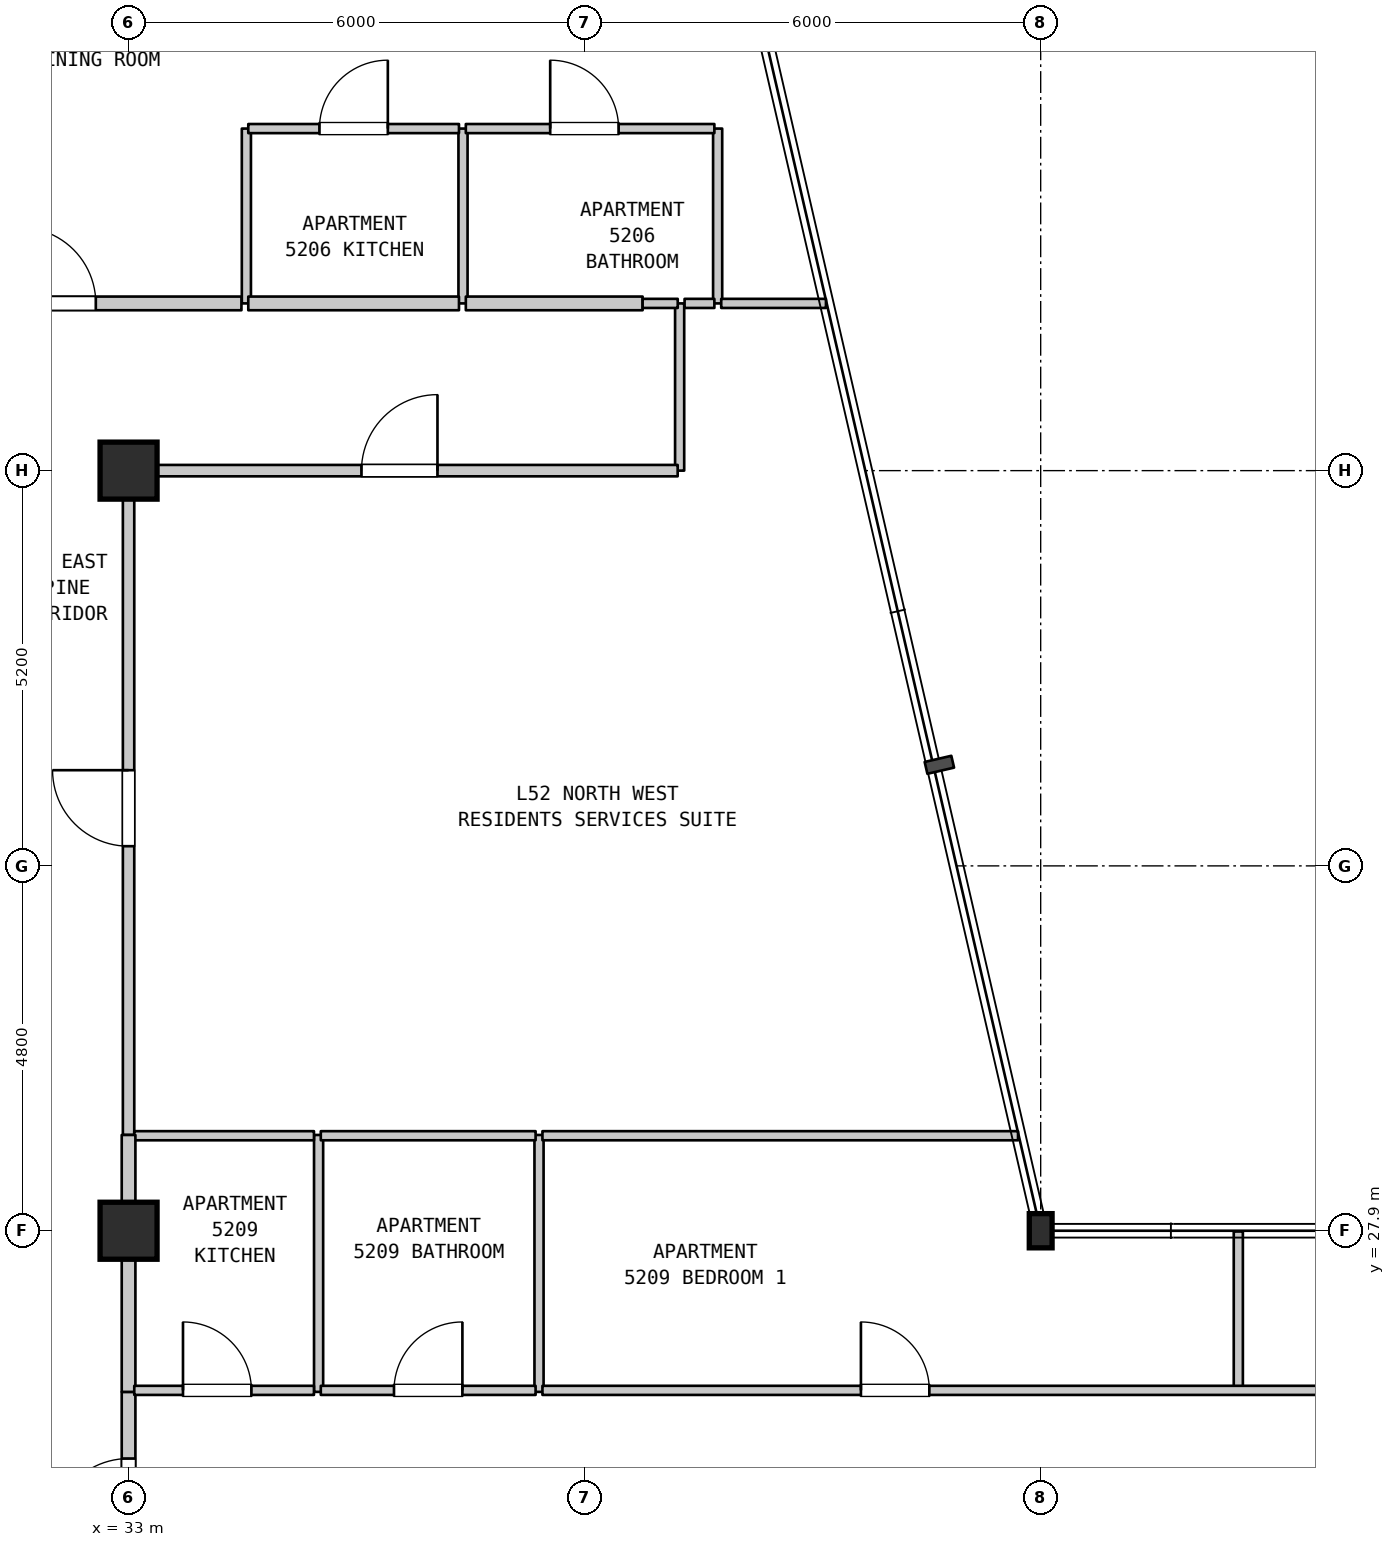
"""IFC4 building model, lengths in metres.
Left out: names, types, materials, properties, quantities, classifications, styles, units other than length and angle.
Written with IfcOpenShell. Run it as: python <this file> out.ifc"""

import sys

from ifc_helpers import new_model, si_unit, direction, frame, frame_2d, origin, origin_2d, place, context, subcontext, project, spatial, rectangle, i_section, extrude, element, fill, save


model = new_model("IFC4")
c1 = context("Model", 3, precision=1e-05, world=origin(), true_north=direction((0.0, 1.0)))
c2 = subcontext(c1, "Body", "Model", "MODEL_VIEW")
j1 = project(units=[si_unit("LENGTHUNIT", "METRE"), si_unit("PLANEANGLEUNIT", "RADIAN")], contexts=[c1])
p1 = place(None, origin())
s1 = spatial("IfcSite", under=j1, at=p1, CompositionType="ELEMENT")
p2 = place(p1, origin())
s2 = spatial("IfcBuilding", under=s1, at=p2, CompositionType="ELEMENT")
p3 = place(p2, frame((0.0, 0.0, 210.6)))
s3 = spatial("IfcBuildingStorey", under=s2, at=p3, CompositionType="ELEMENT", Elevation=210.6)
for number, where, z_axis, x_axis in (
    (1, (33.0, 27.9, 0.0), (0.0, 0.0, 1.0), (1.0, 0.0, 0.0)),
    (2, (33.0, 37.9, 0.0), (0.0, 0.0, 1.0), (1.0, 0.0, 0.0)),
):
    element("IfcColumn", number, at=place(p3, frame(where, z_axis=z_axis, x_axis=x_axis)), inside=s3, PredefinedType="COLUMN", context=c2, shape_type="SweptSolid", body=[
        extrude(rectangle(XDim=0.75, YDim=0.75, at=origin_2d()), origin(), (0.0, 0.0, 1.0), 3.7),
    ])
p4 = place(p3, frame((45.0, 27.9, 0.0), z_axis=(0.0, 0.0, 1.0), x_axis=(1.0, 0.0, 0.0)))
e3 = element("IfcColumn", 3, at=p4, inside=s3, PredefinedType="COLUMN", context=c2, shape_type="SweptSolid", body=[
    extrude(i_section(OverallWidth=0.3, OverallDepth=0.45, WebThickness=0.014, FlangeThickness=0.026, FilletRadius=0.027, at=origin_2d()), origin(), (0.0, 0.0, 1.0), 3.7),
])
p5 = place(p3, frame((33.0, 23.18, 0.0), z_axis=(0.0, 0.0, 1.0), x_axis=(0.0, 1.0, 0.0)))
e4 = element("IfcWall", 4, at=p5, inside=s3, PredefinedType="STANDARD", context=c2, shape_type="SweptSolid", body=[
    extrude(rectangle(XDim=2.6, YDim=0.18, at=frame_2d((1.3, 0.0))), origin(), (0.0, 0.0, 1.0), 2.99),
])
p6 = place(p5, frame((0.723, 0.0, 0.0)))
e5 = element("IfcOpeningElement", 5, at=p6, cuts=e4, PredefinedType="OPENING", context=c2, shape_type="SweptSolid", body=[
    extrude(rectangle(XDim=1.0, YDim=2.15, at=frame_2d((0.5, 1.075))), frame((0.0, 0.1, 0.0), z_axis=(0.0, -1.0, 0.0), x_axis=(1.0, 0.0, 0.0)), (0.0, 0.0, 1.0), 0.2),
])
p7 = place(p3, frame((33.0, 25.78, 0.0), z_axis=(0.0, 0.0, 1.0), x_axis=(0.0, 1.0, 0.0)))
e6 = element("IfcWall", 6, at=p7, inside=s3, PredefinedType="STANDARD", context=c2, shape_type="SweptSolid", body=[
    extrude(rectangle(XDim=2.12, YDim=0.18, at=frame_2d((1.06, 0.0))), origin(), (0.0, 0.0, 1.0), 2.99),
])
p8 = place(p3, frame((33.0, 29.16, 0.0), z_axis=(0.0, 0.0, 1.0), x_axis=(0.0, 1.0, 0.0)))
e7 = element("IfcWall", 7, at=p8, inside=s3, PredefinedType="STANDARD", context=c2, shape_type="SweptSolid", body=[
    extrude(rectangle(XDim=8.74, YDim=0.15, at=frame_2d((4.37, 0.0))), origin(), (0.0, 0.0, 1.0), 2.89),
])
p9 = place(p8, frame((3.799, 0.0, 0.0)))
e8 = element("IfcOpeningElement", 8, at=p9, cuts=e7, PredefinedType="OPENING", context=c2, shape_type="SweptSolid", body=[
    extrude(rectangle(XDim=1.0, YDim=2.15, at=frame_2d((0.5, 1.075))), frame((0.0, 0.085, 0.0), z_axis=(0.0, -1.0, 0.0), x_axis=(1.0, 0.0, 0.0)), (0.0, 0.0, 1.0), 0.17),
])
p10 = place(p3, frame((34.55, 40.1, 0.0), z_axis=(0.0, 0.0, 1.0), x_axis=(0.0, 1.0, 0.0)))
e9 = element("IfcWall", 9, at=p10, inside=s3, PredefinedType="PARTITIONING", context=c2, shape_type="SweptSolid", body=[
    extrude(rectangle(XDim=2.3, YDim=0.12, at=frame_2d((1.15, 0.0))), origin(), (0.0, 0.0, 1.0), 3.39),
])
p11 = place(p3, frame((35.5, 25.78, 0.0), z_axis=(0.0, 0.0, 1.0), x_axis=(0.0, 1.0, 0.0)))
e10 = element("IfcWall", 10, at=p11, inside=s3, PredefinedType="PARTITIONING", context=c2, shape_type="SweptSolid", body=[
    extrude(rectangle(XDim=3.38, YDim=0.12, at=frame_2d((1.69, 0.0))), origin(), (0.0, 0.0, 1.0), 3.39),
])
p12 = place(p3, frame((37.4, 40.1, 0.0), z_axis=(0.0, 0.0, 1.0), x_axis=(0.0, 1.0, 0.0)))
e11 = element("IfcWall", 11, at=p12, inside=s3, PredefinedType="PARTITIONING", context=c2, shape_type="SweptSolid", body=[
    extrude(rectangle(XDim=2.3, YDim=0.12, at=frame_2d((1.15, 0.0))), origin(), (0.0, 0.0, 1.0), 3.39),
])
p13 = place(p3, frame((38.4, 25.78, 0.0), z_axis=(0.0, 0.0, 1.0), x_axis=(0.0, 1.0, 0.0)))
e12 = element("IfcWall", 12, at=p13, inside=s3, PredefinedType="PARTITIONING", context=c2, shape_type="SweptSolid", body=[
    extrude(rectangle(XDim=3.38, YDim=0.12, at=frame_2d((1.69, 0.0))), origin(), (0.0, 0.0, 1.0), 3.39),
])
p14 = place(p3, frame((40.25, 37.9, 0.0), z_axis=(0.0, 0.0, 1.0), x_axis=(0.0, 1.0, 0.0)))
e13 = element("IfcWall", 13, at=p14, inside=s3, PredefinedType="PARTITIONING", context=c2, shape_type="SweptSolid", body=[
    extrude(rectangle(XDim=2.2, YDim=0.12, at=frame_2d((1.1, 0.0))), origin(), (0.0, 0.0, 1.0), 3.39),
])
p15 = place(p3, frame((40.75, 40.1, 0.0), z_axis=(0.0, 0.0, 1.0), x_axis=(0.0, 1.0, 0.0)))
e14 = element("IfcWall", 14, at=p15, inside=s3, PredefinedType="PARTITIONING", context=c2, shape_type="SweptSolid", body=[
    extrude(rectangle(XDim=2.3, YDim=0.12, at=frame_2d((1.15, 0.0))), origin(), (0.0, 0.0, 1.0), 3.39),
])
p16 = place(p3, frame((47.6, 25.78, 0.0), z_axis=(0.0, 0.0, 1.0), x_axis=(0.0, 1.0, 0.0)))
e15 = element("IfcWall", 15, at=p16, inside=s3, PredefinedType="PARTITIONING", context=c2, shape_type="SweptSolid", body=[
    extrude(rectangle(XDim=2.11, YDim=0.12, at=frame_2d((1.055, 0.0))), origin(), (0.0, 0.0, 1.0), 3.39),
])
p17 = place(p3, frame((33.075, 25.8, 0.0), z_axis=(0.0, 0.0, 1.0), x_axis=(1.0, 0.0, 0.0)))
e16 = element("IfcWall", 16, at=p17, inside=s3, PredefinedType="PARTITIONING", context=c2, shape_type="SweptSolid", body=[
    extrude(rectangle(XDim=2.364, YDim=0.12, at=frame_2d((1.182, 0.0))), origin(), (0.0, 0.0, 1.0), 3.39),
])
p18 = place(p17, frame((0.641, 0.0, 0.0)))
e17 = element("IfcOpeningElement", 17, at=p18, cuts=e16, PredefinedType="OPENING", context=c2, shape_type="SweptSolid", body=[
    extrude(rectangle(XDim=0.9, YDim=2.15, at=frame_2d((0.45, 1.075))), frame((0.0, 0.07, 0.0), z_axis=(0.0, -1.0, 0.0), x_axis=(1.0, 0.0, 0.0)), (0.0, 0.0, 1.0), 0.14),
])
p19 = place(p3, frame((35.529, 25.8, 0.0), z_axis=(0.0, 0.0, 1.0), x_axis=(1.0, 0.0, 0.0)))
e18 = element("IfcWall", 18, at=p19, inside=s3, PredefinedType="PARTITIONING", context=c2, shape_type="SweptSolid", body=[
    extrude(rectangle(XDim=2.826, YDim=0.12, at=frame_2d((1.413, 0.0))), origin(), (0.0, 0.0, 1.0), 3.39),
])
p20 = place(p19, frame((0.963, 0.0, 0.0)))
e19 = element("IfcOpeningElement", 19, at=p20, cuts=e18, PredefinedType="OPENING", context=c2, shape_type="SweptSolid", body=[
    extrude(rectangle(XDim=0.9, YDim=2.1, at=frame_2d((0.45, 1.05))), frame((0.0, 0.07, 0.0), z_axis=(0.0, -1.0, 0.0), x_axis=(1.0, 0.0, 0.0)), (0.0, 0.0, 1.0), 0.14),
])
p21 = place(p3, frame((38.445, 25.8, 0.0), z_axis=(0.0, 0.0, 1.0), x_axis=(1.0, 0.0, 0.0)))
e20 = element("IfcWall", 20, at=p21, inside=s3, PredefinedType="PARTITIONING", context=c2, shape_type="SweptSolid", body=[
    extrude(rectangle(XDim=18.545, YDim=0.12, at=frame_2d((9.272, 0.0))), origin(), (0.0, 0.0, 1.0), 3.39),
])
p22 = place(p21, frame((4.19, 0.0, 0.0)))
e21 = element("IfcOpeningElement", 21, at=p22, cuts=e20, PredefinedType="OPENING", context=c2, shape_type="SweptSolid", body=[
    extrude(rectangle(XDim=0.9, YDim=2.15, at=frame_2d((0.45, 1.075))), frame((0.0, 0.07, 0.0), z_axis=(0.0, -1.0, 0.0), x_axis=(1.0, 0.0, 0.0)), (0.0, 0.0, 1.0), 0.14),
])
p23 = place(p21, frame((13.335, 0.0, 0.0)))
e22 = element("IfcOpeningElement", 22, at=p23, cuts=e20, PredefinedType="OPENING", context=c2, shape_type="SweptSolid", body=[
    extrude(rectangle(XDim=0.9, YDim=2.15, at=frame_2d((0.45, 1.075))), frame((0.0, 0.07, 0.0), z_axis=(0.0, -1.0, 0.0), x_axis=(1.0, 0.0, 0.0)), (0.0, 0.0, 1.0), 0.14),
])
p24 = place(p3, frame((33.075, 29.15, 0.0), z_axis=(0.0, 0.0, 1.0), x_axis=(1.0, 0.0, 0.0)))
e23 = element("IfcWall", 23, at=p24, inside=s3, PredefinedType="PARTITIONING", context=c2, shape_type="SweptSolid", body=[
    extrude(rectangle(XDim=2.364, YDim=0.12, at=frame_2d((1.182, 0.0))), origin(), (0.0, 0.0, 1.0), 3.39),
])
p25 = place(p3, frame((35.529, 29.15, 0.0), z_axis=(0.0, 0.0, 1.0), x_axis=(1.0, 0.0, 0.0)))
e24 = element("IfcWall", 24, at=p25, inside=s3, PredefinedType="PARTITIONING", context=c2, shape_type="SweptSolid", body=[
    extrude(rectangle(XDim=2.826, YDim=0.12, at=frame_2d((1.413, 0.0))), origin(), (0.0, 0.0, 1.0), 3.39),
])
p26 = place(p3, frame((38.445, 29.15, 0.0), z_axis=(0.0, 0.0, 1.0), x_axis=(1.0, 0.0, 0.0)))
e25 = element("IfcWall", 25, at=p26, inside=s3, PredefinedType="PARTITIONING", context=c2, shape_type="SweptSolid", body=[
    extrude(rectangle(XDim=6.257, YDim=0.12, at=frame_2d((3.128, 0.0))), origin(), (0.0, 0.0, 1.0), 3.39),
])
p27 = place(p3, frame((33.06, 37.9, 0.0), z_axis=(0.0, 0.0, 1.0), x_axis=(1.0, 0.0, 0.0)))
e26 = element("IfcWall", 26, at=p27, inside=s3, PredefinedType="STANDARD", context=c2, shape_type="SweptSolid", body=[
    extrude(rectangle(XDim=7.164, YDim=0.15, at=frame_2d((3.582, 0.0))), origin(), (0.0, 0.0, 1.0), 3.39),
])
p28 = place(p27, frame((3.004, 0.0, 0.0)))
e27 = element("IfcOpeningElement", 27, at=p28, cuts=e26, PredefinedType="OPENING", context=c2, shape_type="SweptSolid", body=[
    extrude(rectangle(XDim=1.0, YDim=2.15, at=frame_2d((0.5, 1.075))), frame((0.0, 0.085, 0.0), z_axis=(0.0, -1.0, 0.0), x_axis=(1.0, 0.0, 0.0)), (0.0, 0.0, 1.0), 0.17),
])
p29 = place(p3, frame((29.395, 40.1, 0.0), z_axis=(0.0, 0.0, 1.0), x_axis=(1.0, 0.0, 0.0)))
e28 = element("IfcWall", 28, at=p29, inside=s3, PredefinedType="STANDARD", context=c2, shape_type="SweptSolid", body=[
    extrude(rectangle(XDim=5.09, YDim=0.18, at=frame_2d((2.545, 0.0))), origin(), (0.0, 0.0, 1.0), 3.39),
])
p30 = place(p29, frame((2.174, 0.0, 0.0)))
e29 = element("IfcOpeningElement", 29, at=p30, cuts=e28, PredefinedType="OPENING", context=c2, shape_type="SweptSolid", body=[
    extrude(rectangle(XDim=1.0, YDim=2.15, at=frame_2d((0.5, 1.075))), frame((0.0, 0.1, 0.0), z_axis=(0.0, -1.0, 0.0), x_axis=(1.0, 0.0, 0.0)), (0.0, 0.0, 1.0), 0.2),
])
p31 = place(p3, frame((34.575, 40.1, 0.0), z_axis=(0.0, 0.0, 1.0), x_axis=(1.0, 0.0, 0.0)))
e30 = element("IfcWall", 30, at=p31, inside=s3, PredefinedType="STANDARD", context=c2, shape_type="SweptSolid", body=[
    extrude(rectangle(XDim=2.772, YDim=0.18, at=frame_2d((1.386, 0.0))), origin(), (0.0, 0.0, 1.0), 3.39),
])
p32 = place(p3, frame((37.437, 40.1, 0.0), z_axis=(0.0, 0.0, 1.0), x_axis=(1.0, 0.0, 0.0)))
e31 = element("IfcWall", 31, at=p32, inside=s3, PredefinedType="STANDARD", context=c2, shape_type="SweptSolid", body=[
    extrude(rectangle(XDim=2.326, YDim=0.18, at=frame_2d((1.163, 0.0))), origin(), (0.0, 0.0, 1.0), 3.39),
])
p33 = place(p3, frame((39.763, 40.1, 0.0), z_axis=(0.0, 0.0, 1.0), x_axis=(1.0, 0.0, 0.0)))
e32 = element("IfcWall", 32, at=p33, inside=s3, PredefinedType="PARTITIONING", context=c2, shape_type="SweptSolid", body=[
    extrude(rectangle(XDim=0.462, YDim=0.12, at=frame_2d((0.231, 0.0))), origin(), (0.0, 0.0, 1.0), 3.39),
])
p34 = place(p3, frame((40.315, 40.1, 0.0), z_axis=(0.0, 0.0, 1.0), x_axis=(1.0, 0.0, 0.0)))
e33 = element("IfcWall", 33, at=p34, inside=s3, PredefinedType="PARTITIONING", context=c2, shape_type="SweptSolid", body=[
    extrude(rectangle(XDim=0.392, YDim=0.12, at=frame_2d((0.196, 0.0))), origin(), (0.0, 0.0, 1.0), 3.39),
])
p35 = place(p3, frame((40.797, 40.1, 0.0), z_axis=(0.0, 0.0, 1.0), x_axis=(1.0, 0.0, 0.0)))
e34 = element("IfcWall", 34, at=p35, inside=s3, PredefinedType="PARTITIONING", context=c2, shape_type="SweptSolid", body=[
    extrude(rectangle(XDim=1.378, YDim=0.12, at=frame_2d((0.689, 0.0))), origin(), (0.0, 0.0, 1.0), 3.39),
])
p36 = place(p3, frame((34.575, 42.4, 0.0), z_axis=(0.0, 0.0, 1.0), x_axis=(1.0, 0.0, 0.0)))
e35 = element("IfcWall", 35, at=p36, inside=s3, PredefinedType="PARTITIONING", context=c2, shape_type="SweptSolid", body=[
    extrude(rectangle(XDim=2.772, YDim=0.12, at=frame_2d((1.386, 0.0))), origin(), (0.0, 0.0, 1.0), 3.39),
])
p37 = place(p36, frame((0.936, 0.0, 0.0)))
e36 = element("IfcOpeningElement", 36, at=p37, cuts=e35, PredefinedType="OPENING", context=c2, shape_type="SweptSolid", body=[
    extrude(rectangle(XDim=0.9, YDim=2.15, at=frame_2d((0.45, 1.075))), frame((0.0, 0.07, 0.0), z_axis=(0.0, -1.0, 0.0), x_axis=(1.0, 0.0, 0.0)), (0.0, 0.0, 1.0), 0.14),
])
p38 = place(p3, frame((37.437, 42.4, 0.0), z_axis=(0.0, 0.0, 1.0), x_axis=(1.0, 0.0, 0.0)))
e37 = element("IfcWall", 37, at=p38, inside=s3, PredefinedType="PARTITIONING", context=c2, shape_type="SweptSolid", body=[
    extrude(rectangle(XDim=3.27, YDim=0.12, at=frame_2d((1.635, 0.0))), origin(), (0.0, 0.0, 1.0), 3.39),
])
p39 = place(p38, frame((1.11, 0.0, 0.0)))
e38 = element("IfcOpeningElement", 38, at=p39, cuts=e37, PredefinedType="OPENING", context=c2, shape_type="SweptSolid", body=[
    extrude(rectangle(XDim=0.9, YDim=2.1, at=frame_2d((0.45, 1.05))), frame((0.0, 0.07, 0.0), z_axis=(0.0, -1.0, 0.0), x_axis=(1.0, 0.0, 0.0)), (0.0, 0.0, 1.0), 0.14),
])
p40 = place(p3, frame((33.0, 27.9, 0.0), z_axis=(0.0, 0.0, 1.0), x_axis=(0.0, 1.0, 0.0)))
e39 = element("IfcWall", 39, at=p40, inside=s3, PredefinedType="STANDARD", context=c2, shape_type="SweptSolid", body=[
    extrude(rectangle(XDim=1.26, YDim=0.18, at=frame_2d((0.63, 0.0))), origin(), (0.0, 0.0, 1.0), 2.89),
])
p41 = place(p6, origin())
e40 = element("IfcDoor", 40, at=p41, inside=s3, OperationType="SINGLE_SWING_LEFT", PredefinedType="DOOR", context=c2, shape_type="SweptSolid", body=[
    extrude(rectangle(XDim=1.0, YDim=2.15, at=frame_2d((0.5, 1.075))), frame((0.0, 0.025, 0.0), z_axis=(0.0, -1.0, 0.0), x_axis=(1.0, 0.0, 0.0)), (0.0, 0.0, 1.0), 0.05),
])
fill(e5, e40)
p42 = place(p9, origin())
e41 = element("IfcDoor", 41, at=p42, inside=s3, OperationType="SINGLE_SWING_RIGHT", PredefinedType="DOOR", context=c2, shape_type="SweptSolid", body=[
    extrude(rectangle(XDim=1.0, YDim=2.15, at=frame_2d((0.5, 1.075))), frame((0.0, 0.025, 0.0), z_axis=(0.0, -1.0, 0.0), x_axis=(1.0, 0.0, 0.0)), (0.0, 0.0, 1.0), 0.05),
])
fill(e8, e41)
p43 = place(p18, origin())
e42 = element("IfcDoor", 42, at=p43, inside=s3, OperationType="SINGLE_SWING_LEFT", PredefinedType="DOOR", context=c2, shape_type="SweptSolid", body=[
    extrude(rectangle(XDim=0.9, YDim=2.15, at=frame_2d((0.45, 1.075))), frame((0.0, 0.025, 0.0), z_axis=(0.0, -1.0, 0.0), x_axis=(1.0, 0.0, 0.0)), (0.0, 0.0, 1.0), 0.05),
])
fill(e17, e42)
p44 = place(p20, origin())
e43 = element("IfcDoor", 43, at=p44, inside=s3, OperationType="SINGLE_SWING_RIGHT", PredefinedType="DOOR", context=c2, shape_type="SweptSolid", body=[
    extrude(rectangle(XDim=0.9, YDim=2.1, at=frame_2d((0.45, 1.05))), frame((0.0, 0.025, 0.0), z_axis=(0.0, -1.0, 0.0), x_axis=(1.0, 0.0, 0.0)), (0.0, 0.0, 1.0), 0.05),
])
fill(e19, e43)
p45 = place(p22, origin())
e44 = element("IfcDoor", 44, at=p45, inside=s3, OperationType="SINGLE_SWING_LEFT", PredefinedType="DOOR", context=c2, shape_type="SweptSolid", body=[
    extrude(rectangle(XDim=0.9, YDim=2.15, at=frame_2d((0.45, 1.075))), frame((0.0, 0.025, 0.0), z_axis=(0.0, -1.0, 0.0), x_axis=(1.0, 0.0, 0.0)), (0.0, 0.0, 1.0), 0.05),
])
fill(e21, e44)
p46 = place(p28, origin())
e45 = element("IfcDoor", 45, at=p46, inside=s3, OperationType="SINGLE_SWING_RIGHT", PredefinedType="DOOR", context=c2, shape_type="SweptSolid", body=[
    extrude(rectangle(XDim=1.0, YDim=2.15, at=frame_2d((0.5, 1.075))), frame((0.0, 0.025, 0.0), z_axis=(0.0, -1.0, 0.0), x_axis=(1.0, 0.0, 0.0)), (0.0, 0.0, 1.0), 0.05),
])
fill(e27, e45)
p47 = place(p30, origin())
e46 = element("IfcDoor", 46, at=p47, inside=s3, OperationType="SINGLE_SWING_LEFT", PredefinedType="DOOR", context=c2, shape_type="SweptSolid", body=[
    extrude(rectangle(XDim=1.0, YDim=2.15, at=frame_2d((0.5, 1.075))), frame((0.0, 0.025, 0.0), z_axis=(0.0, -1.0, 0.0), x_axis=(1.0, 0.0, 0.0)), (0.0, 0.0, 1.0), 0.05),
])
fill(e29, e46)
p48 = place(p37, origin())
e47 = element("IfcDoor", 47, at=p48, inside=s3, OperationType="SINGLE_SWING_RIGHT", PredefinedType="DOOR", context=c2, shape_type="SweptSolid", body=[
    extrude(rectangle(XDim=0.9, YDim=2.15, at=frame_2d((0.45, 1.075))), frame((0.0, 0.025, 0.0), z_axis=(0.0, -1.0, 0.0), x_axis=(1.0, 0.0, 0.0)), (0.0, 0.0, 1.0), 0.05),
])
fill(e36, e47)
p49 = place(p39, origin())
e48 = element("IfcDoor", 48, at=p49, inside=s3, OperationType="SINGLE_SWING_LEFT", PredefinedType="DOOR", context=c2, shape_type="SweptSolid", body=[
    extrude(rectangle(XDim=0.9, YDim=2.1, at=frame_2d((0.45, 1.05))), frame((0.0, 0.025, 0.0), z_axis=(0.0, -1.0, 0.0), x_axis=(1.0, 0.0, 0.0)), (0.0, 0.0, 1.0), 0.05),
])
fill(e38, e48)
save(model, sys.argv[1])
